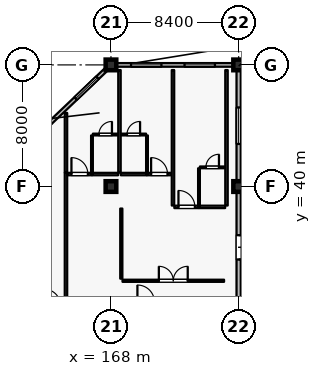
"""IFC4 building model, lengths in metres.
Left out: names, types, materials, properties, quantities, classifications, styles, units other than length and angle.
Written with IfcOpenShell. Run it as: python <this file> out.ifc"""

import sys

from ifc_helpers import new_model, si_unit, direction, frame, frame_2d, origin, origin_2d, place, context, subcontext, project, spatial, rectangle, extrude, element, fill, save


model = new_model("IFC4")
c1 = context("Model", 3, precision=1e-05, world=origin(), true_north=direction((0.0, 1.0)))
c2 = subcontext(c1, "Body", "Model", "MODEL_VIEW")
j1 = project(units=[si_unit("LENGTHUNIT", "METRE"), si_unit("PLANEANGLEUNIT", "RADIAN")], contexts=[c1])
p1 = place(None, origin())
s1 = spatial("IfcSite", under=j1, at=p1, CompositionType="ELEMENT")
p2 = place(p1, origin())
s2 = spatial("IfcBuilding", under=s1, at=p2, CompositionType="ELEMENT")
p3 = place(p2, frame((0.0, 0.0, 28.8)))
s3 = spatial("IfcBuildingStorey", under=s2, at=p3, CompositionType="ELEMENT", Elevation=28.8)
for number, where, z_axis, x_axis in (
    (1, (168.0, 48.0, 0.0), (0.0, 0.0, 1.0), (1.0, 0.0, 0.0)),
    (2, (176.4, 48.0, 0.0), (0.0, 0.0, 1.0), (1.0, 0.0, 0.0)),
    (3, (168.0, 40.0, 0.0), (0.0, 0.0, 1.0), (1.0, 0.0, 0.0)),
    (4, (176.4, 40.0, 0.0), (0.0, 0.0, 1.0), (1.0, 0.0, 0.0)),
):
    element("IfcColumn", number, at=place(p3, frame(where, z_axis=z_axis, x_axis=x_axis)), inside=s3, PredefinedType="COLUMN", context=c2, shape_type="SweptSolid", body=[
        extrude(rectangle(XDim=0.7, YDim=0.7, at=origin_2d()), origin(), (0.0, 0.0, 1.0), 3.6),
    ])
p4 = place(p3, frame((159.95, 40.333, 0.0), z_axis=(0.0, 0.0, 1.0), x_axis=(0.724105170588, 0.689689569247, 0.0)))
e5 = element("IfcWall", 5, at=p4, inside=s3, PredefinedType="SOLIDWALL", context=c2, shape_type="SweptSolid", body=[
    extrude(rectangle(XDim=10.634, YDim=0.24, at=frame_2d((5.317, 0.0))), origin(), (0.0, 0.0, 1.0), 2.93),
])
p5 = place(p4, frame((0.215, 0.0, 0.8)))
e6 = element("IfcOpeningElement", 6, at=p5, cuts=e5, PredefinedType="OPENING", context=c2, shape_type="SweptSolid", body=[
    extrude(rectangle(XDim=1.6, YDim=1.6, at=frame_2d((0.8, 0.8))), frame((0.0, 0.13, 0.0), z_axis=(0.0, -1.0, 0.0), x_axis=(1.0, 0.0, 0.0)), (0.0, 0.0, 1.0), 0.26),
])
p6 = place(p4, frame((3.599, 0.0, 0.8)))
e7 = element("IfcOpeningElement", 7, at=p6, cuts=e5, PredefinedType="OPENING", context=c2, shape_type="SweptSolid", body=[
    extrude(rectangle(XDim=2.0, YDim=1.75, at=frame_2d((1.0, 0.875))), frame((0.0, 0.13, 0.0), z_axis=(0.0, -1.0, 0.0), x_axis=(1.0, 0.0, 0.0)), (0.0, 0.0, 1.0), 0.26),
])
p7 = place(p4, frame((7.901, 0.0, 0.8)))
e8 = element("IfcOpeningElement", 8, at=p7, cuts=e5, PredefinedType="OPENING", context=c2, shape_type="SweptSolid", body=[
    extrude(rectangle(XDim=2.0, YDim=1.75, at=frame_2d((1.0, 0.875))), frame((0.0, 0.13, 0.0), z_axis=(0.0, -1.0, 0.0), x_axis=(1.0, 0.0, 0.0)), (0.0, 0.0, 1.0), 0.26),
])
p8 = place(p3, frame((168.35, 48.0, 0.0), z_axis=(0.0, 0.0, 1.0), x_axis=(1.0, 0.0, 0.0)))
e9 = element("IfcWall", 9, at=p8, inside=s3, PredefinedType="SOLIDWALL", context=c2, shape_type="SweptSolid", body=[
    extrude(rectangle(XDim=7.7, YDim=0.24, at=frame_2d((3.85, 0.0))), origin(), (0.0, 0.0, 1.0), 2.93),
])
p9 = place(p8, frame((0.97, 0.0, 0.8)))
e10 = element("IfcOpeningElement", 10, at=p9, cuts=e9, PredefinedType="OPENING", context=c2, shape_type="SweptSolid", body=[
    extrude(rectangle(XDim=2.0, YDim=1.75, at=frame_2d((1.0, 0.875))), frame((0.0, 0.13, 0.0), z_axis=(0.0, -1.0, 0.0), x_axis=(1.0, 0.0, 0.0)), (0.0, 0.0, 1.0), 0.26),
])
p10 = place(p8, frame((4.49, 0.0, 0.8)))
e11 = element("IfcOpeningElement", 11, at=p10, cuts=e9, PredefinedType="OPENING", context=c2, shape_type="SweptSolid", body=[
    extrude(rectangle(XDim=2.0, YDim=1.75, at=frame_2d((1.0, 0.875))), frame((0.0, 0.13, 0.0), z_axis=(0.0, -1.0, 0.0), x_axis=(1.0, 0.0, 0.0)), (0.0, 0.0, 1.0), 0.26),
])
p11 = place(p3, frame((176.4, 47.65, 0.0), z_axis=(0.0, 0.0, 1.0), x_axis=(0.0, -1.0, 0.0)))
e12 = element("IfcWall", 12, at=p11, inside=s3, PredefinedType="SOLIDWALL", context=c2, shape_type="SweptSolid", body=[
    extrude(rectangle(XDim=7.3, YDim=0.28, at=frame_2d((3.65, 0.0))), origin(), (0.0, 0.0, 1.0), 2.7),
])
p12 = place(p11, frame((2.45, 0.0, 0.5)))
e13 = element("IfcOpeningElement", 13, at=p12, cuts=e12, PredefinedType="OPENING", context=c2, shape_type="SweptSolid", body=[
    extrude(rectangle(XDim=2.4, YDim=1.65, at=frame_2d((1.2, 0.825))), frame((0.0, 0.15, 0.0), z_axis=(0.0, -1.0, 0.0), x_axis=(1.0, 0.0, 0.0)), (0.0, 0.0, 1.0), 0.3),
])
p13 = place(p3, frame((176.4, 39.65, 0.0), z_axis=(0.0, 0.0, 1.0), x_axis=(0.0, -1.0, 0.0)))
e14 = element("IfcWall", 14, at=p13, inside=s3, PredefinedType="SOLIDWALL", context=c2, shape_type="SweptSolid", body=[
    extrude(rectangle(XDim=7.3, YDim=0.28, at=frame_2d((3.65, 0.0))), origin(), (0.0, 0.0, 1.0), 2.7),
])
p14 = place(p13, frame((2.85, 0.0, 0.0)))
e15 = element("IfcOpeningElement", 15, at=p14, cuts=e14, PredefinedType="OPENING", context=c2, shape_type="SweptSolid", body=[
    extrude(rectangle(XDim=1.6, YDim=2.25, at=frame_2d((0.8, 1.125))), frame((0.0, 0.15, 0.0), z_axis=(0.0, -1.0, 0.0), x_axis=(1.0, 0.0, 0.0)), (0.0, 0.0, 1.0), 0.3),
])
p15 = place(p3, frame((165.04, 32.26, 0.0), z_axis=(0.0, 0.0, 1.0), x_axis=(0.0, 1.0, 0.0)))
e16 = element("IfcWall", 16, at=p15, inside=s3, PredefinedType="PARTITIONING", context=c2, shape_type="SweptSolid", body=[
    extrude(rectangle(XDim=8.64, YDim=0.16, at=frame_2d((4.32, 0.0))), origin(), (0.0, 0.0, 1.0), 3.365),
])
p16 = place(p3, frame((165.13, 40.82, 0.0), z_axis=(0.0, 0.0, 1.0), x_axis=(1.0, 0.0, 0.0)))
e17 = element("IfcWall", 17, at=p16, inside=s3, PredefinedType="PARTITIONING", context=c2, shape_type="SweptSolid", body=[
    extrude(rectangle(XDim=1.62, YDim=0.16, at=frame_2d((0.81, 0.0))), origin(), (0.0, 0.0, 1.0), 3.365),
])
p17 = place(p16, frame((0.27, 0.0, 0.0)))
e18 = element("IfcOpeningElement", 18, at=p17, cuts=e17, PredefinedType="OPENING", context=c2, shape_type="SweptSolid", body=[
    extrude(rectangle(XDim=1.08, YDim=2.3, at=frame_2d((0.54, 1.15))), frame((0.0, 0.09, 0.0), z_axis=(0.0, -1.0, 0.0), x_axis=(1.0, 0.0, 0.0)), (0.0, 0.0, 1.0), 0.18),
])
p18 = place(p3, frame((166.76, 40.82, 0.0), z_axis=(0.0, 0.0, 1.0), x_axis=(1.0, 0.0, 0.0)))
e19 = element("IfcWall", 19, at=p18, inside=s3, PredefinedType="PARTITIONING", context=c2, shape_type="SweptSolid", body=[
    extrude(rectangle(XDim=1.71, YDim=0.16, at=frame_2d((0.855, 0.0))), origin(), (0.0, 0.0, 1.0), 3.365),
])
p19 = place(p3, frame((166.75, 40.91, 0.0), z_axis=(0.0, 0.0, 1.0), x_axis=(0.0, 1.0, 0.0)))
e20 = element("IfcWall", 20, at=p19, inside=s3, PredefinedType="PARTITIONING", context=c2, shape_type="SweptSolid", body=[
    extrude(rectangle(XDim=2.45, YDim=0.115, at=frame_2d((1.225, 0.0))), origin(), (0.0, 0.0, 1.0), 3.365),
])
p20 = place(p3, frame((166.81, 43.42, 0.0), z_axis=(0.0, 0.0, 1.0), x_axis=(1.0, 0.0, 0.0)))
e21 = element("IfcWall", 21, at=p20, inside=s3, PredefinedType="PARTITIONING", context=c2, shape_type="SweptSolid", body=[
    extrude(rectangle(XDim=1.65, YDim=0.115, at=frame_2d((0.825, 0.0))), origin(), (0.0, 0.0, 1.0), 3.365),
])
p21 = place(p20, frame((0.395, 0.0, 0.0)))
e22 = element("IfcOpeningElement", 22, at=p21, cuts=e21, PredefinedType="OPENING", context=c2, shape_type="SweptSolid", body=[
    extrude(rectangle(XDim=0.86, YDim=2.12, at=frame_2d((0.43, 1.06))), frame((0.0, 0.067, 0.0), z_axis=(0.0, -1.0, 0.0), x_axis=(1.0, 0.0, 0.0)), (0.0, 0.0, 1.0), 0.135),
])
p22 = place(p3, frame((165.04, 40.91, 0.0), z_axis=(0.0, 0.0, 1.0), x_axis=(0.0, 1.0, 0.0)))
e23 = element("IfcWall", 23, at=p22, inside=s3, PredefinedType="PARTITIONING", context=c2, shape_type="SweptSolid", body=[
    extrude(rectangle(XDim=3.93, YDim=0.16, at=frame_2d((1.965, 0.0))), origin(), (0.0, 0.0, 1.0), 3.365),
])
p23 = place(p3, frame((168.65, 40.82, 0.0), z_axis=(0.0, 0.0, 1.0), x_axis=(1.0, 0.0, 0.0)))
e24 = element("IfcWall", 24, at=p23, inside=s3, PredefinedType="PARTITIONING", context=c2, shape_type="SweptSolid", body=[
    extrude(rectangle(XDim=1.71, YDim=0.16, at=frame_2d((0.855, 0.0))), origin(), (0.0, 0.0, 1.0), 3.365),
])
p24 = place(p3, frame((170.37, 40.82, 0.0), z_axis=(0.0, 0.0, 1.0), x_axis=(1.0, 0.0, 0.0)))
e25 = element("IfcWall", 25, at=p24, inside=s3, PredefinedType="PARTITIONING", context=c2, shape_type="SweptSolid", body=[
    extrude(rectangle(XDim=1.62, YDim=0.16, at=frame_2d((0.81, 0.0))), origin(), (0.0, 0.0, 1.0), 3.365),
])
p25 = place(p24, frame((0.27, 0.0, 0.0)))
e26 = element("IfcOpeningElement", 26, at=p25, cuts=e25, PredefinedType="OPENING", context=c2, shape_type="SweptSolid", body=[
    extrude(rectangle(XDim=1.08, YDim=2.3, at=frame_2d((0.54, 1.15))), frame((0.0, 0.09, 0.0), z_axis=(0.0, -1.0, 0.0), x_axis=(1.0, 0.0, 0.0)), (0.0, 0.0, 1.0), 0.18),
])
p26 = place(p3, frame((170.37, 40.91, 0.0), z_axis=(0.0, 0.0, 1.0), x_axis=(0.0, 1.0, 0.0)))
e27 = element("IfcWall", 27, at=p26, inside=s3, PredefinedType="PARTITIONING", context=c2, shape_type="SweptSolid", body=[
    extrude(rectangle(XDim=2.45, YDim=0.115, at=frame_2d((1.225, 0.0))), origin(), (0.0, 0.0, 1.0), 3.365),
])
p27 = place(p3, frame((168.66, 43.42, 0.0), z_axis=(0.0, 0.0, 1.0), x_axis=(1.0, 0.0, 0.0)))
e28 = element("IfcWall", 28, at=p27, inside=s3, PredefinedType="PARTITIONING", context=c2, shape_type="SweptSolid", body=[
    extrude(rectangle(XDim=1.65, YDim=0.115, at=frame_2d((0.825, 0.0))), origin(), (0.0, 0.0, 1.0), 3.365),
])
p28 = place(p27, frame((0.395, 0.0, 0.0)))
e29 = element("IfcOpeningElement", 29, at=p28, cuts=e28, PredefinedType="OPENING", context=c2, shape_type="SweptSolid", body=[
    extrude(rectangle(XDim=0.86, YDim=2.12, at=frame_2d((0.43, 1.06))), frame((0.0, 0.067, 0.0), z_axis=(0.0, -1.0, 0.0), x_axis=(1.0, 0.0, 0.0)), (0.0, 0.0, 1.0), 0.135),
])
p29 = place(p3, frame((168.56, 40.91, 0.0), z_axis=(0.0, 0.0, 1.0), x_axis=(0.0, 1.0, 0.0)))
e30 = element("IfcWall", 30, at=p29, inside=s3, PredefinedType="PARTITIONING", context=c2, shape_type="SweptSolid", body=[
    extrude(rectangle(XDim=6.75, YDim=0.16, at=frame_2d((3.375, 0.0))), origin(), (0.0, 0.0, 1.0), 3.365),
])
p30 = place(p3, frame((172.17, 38.66, 0.0), z_axis=(0.0, 0.0, 1.0), x_axis=(1.0, 0.0, 0.0)))
e31 = element("IfcWall", 31, at=p30, inside=s3, PredefinedType="PARTITIONING", context=c2, shape_type="SweptSolid", body=[
    extrude(rectangle(XDim=1.62, YDim=0.16, at=frame_2d((0.81, 0.0))), origin(), (0.0, 0.0, 1.0), 3.365),
])
p31 = place(p30, frame((0.27, 0.0, 0.0)))
e32 = element("IfcOpeningElement", 32, at=p31, cuts=e31, PredefinedType="OPENING", context=c2, shape_type="SweptSolid", body=[
    extrude(rectangle(XDim=1.08, YDim=2.3, at=frame_2d((0.54, 1.15))), frame((0.0, 0.09, 0.0), z_axis=(0.0, -1.0, 0.0), x_axis=(1.0, 0.0, 0.0)), (0.0, 0.0, 1.0), 0.18),
])
p32 = place(p3, frame((173.8, 38.66, 0.0), z_axis=(0.0, 0.0, 1.0), x_axis=(1.0, 0.0, 0.0)))
e33 = element("IfcWall", 33, at=p32, inside=s3, PredefinedType="PARTITIONING", context=c2, shape_type="SweptSolid", body=[
    extrude(rectangle(XDim=1.71, YDim=0.16, at=frame_2d((0.855, 0.0))), origin(), (0.0, 0.0, 1.0), 3.365),
])
p33 = place(p3, frame((173.79, 38.75, 0.0), z_axis=(0.0, 0.0, 1.0), x_axis=(0.0, 1.0, 0.0)))
e34 = element("IfcWall", 34, at=p33, inside=s3, PredefinedType="PARTITIONING", context=c2, shape_type="SweptSolid", body=[
    extrude(rectangle(XDim=2.45, YDim=0.115, at=frame_2d((1.225, 0.0))), origin(), (0.0, 0.0, 1.0), 3.365),
])
p34 = place(p3, frame((173.85, 41.26, 0.0), z_axis=(0.0, 0.0, 1.0), x_axis=(1.0, 0.0, 0.0)))
e35 = element("IfcWall", 35, at=p34, inside=s3, PredefinedType="PARTITIONING", context=c2, shape_type="SweptSolid", body=[
    extrude(rectangle(XDim=1.65, YDim=0.115, at=frame_2d((0.825, 0.0))), origin(), (0.0, 0.0, 1.0), 3.365),
])
p35 = place(p34, frame((0.395, 0.0, 0.0)))
e36 = element("IfcOpeningElement", 36, at=p35, cuts=e35, PredefinedType="OPENING", context=c2, shape_type="SweptSolid", body=[
    extrude(rectangle(XDim=0.86, YDim=2.12, at=frame_2d((0.43, 1.06))), frame((0.0, 0.067, 0.0), z_axis=(0.0, -1.0, 0.0), x_axis=(1.0, 0.0, 0.0)), (0.0, 0.0, 1.0), 0.135),
])
for number, where, z_axis, x_axis in (
    (37, (172.08, 38.75, 0.0), (0.0, 0.0, 1.0), (0.0, 1.0, 0.0)),
    (38, (175.6, 38.75, 0.0), (0.0, 0.0, 1.0), (0.0, 1.0, 0.0)),
):
    element("IfcWall", number, at=place(p3, frame(where, z_axis=z_axis, x_axis=x_axis)), inside=s3, PredefinedType="PARTITIONING", context=c2, shape_type="SweptSolid", body=[
        extrude(rectangle(XDim=8.91, YDim=0.16, at=frame_2d((4.455, 0.0))), origin(), (0.0, 0.0, 1.0), 3.365),
    ])
p36 = place(p3, frame((168.76, 33.8, 0.0), z_axis=(0.0, 0.0, 1.0), x_axis=(1.0, 0.0, 0.0)))
e39 = element("IfcWall", 39, at=p36, inside=s3, PredefinedType="PARTITIONING", context=c2, shape_type="SweptSolid", body=[
    extrude(rectangle(XDim=6.68, YDim=0.14, at=frame_2d((3.34, 0.0))), origin(), (0.0, 0.0, 1.0), 3.365),
])
p37 = place(p36, frame((2.39, 0.0, 0.0)))
e40 = element("IfcOpeningElement", 40, at=p37, cuts=e39, PredefinedType="OPENING", context=c2, shape_type="SweptSolid", body=[
    extrude(rectangle(XDim=1.9, YDim=2.4, at=frame_2d((0.95, 1.2))), frame((0.0, 0.08, 0.0), z_axis=(0.0, -1.0, 0.0), x_axis=(1.0, 0.0, 0.0)), (0.0, 0.0, 1.0), 0.16),
])
p38 = place(p3, frame((168.68, 33.94, 0.0), z_axis=(0.0, 0.0, 1.0), x_axis=(0.0, 1.0, 0.0)))
e41 = element("IfcWall", 41, at=p38, inside=s3, PredefinedType="PARTITIONING", context=c2, shape_type="SweptSolid", body=[
    extrude(rectangle(XDim=4.61, YDim=0.14, at=frame_2d((2.305, 0.0))), origin(), (0.0, 0.0, 1.0), 3.365),
])
p39 = place(p7, origin())
e42 = element("IfcWindow", 42, at=p39, inside=s3, PartitioningType="DOUBLE_PANEL_VERTICAL", PredefinedType="WINDOW", context=c2, shape_type="SweptSolid", body=[
    extrude(rectangle(XDim=2.0, YDim=1.75, at=frame_2d((1.0, 0.875))), frame((0.0, 0.03, 0.0), z_axis=(0.0, -1.0, 0.0), x_axis=(1.0, 0.0, 0.0)), (0.0, 0.0, 1.0), 0.06),
])
fill(e8, e42)
p40 = place(p9, origin())
e43 = element("IfcWindow", 43, at=p40, inside=s3, PartitioningType="DOUBLE_PANEL_VERTICAL", PredefinedType="WINDOW", context=c2, shape_type="SweptSolid", body=[
    extrude(rectangle(XDim=2.0, YDim=1.75, at=frame_2d((1.0, 0.875))), frame((0.0, 0.03, 0.0), z_axis=(0.0, -1.0, 0.0), x_axis=(1.0, 0.0, 0.0)), (0.0, 0.0, 1.0), 0.06),
])
fill(e10, e43)
p41 = place(p10, origin())
e44 = element("IfcWindow", 44, at=p41, inside=s3, PartitioningType="DOUBLE_PANEL_VERTICAL", PredefinedType="WINDOW", context=c2, shape_type="SweptSolid", body=[
    extrude(rectangle(XDim=2.0, YDim=1.75, at=frame_2d((1.0, 0.875))), frame((0.0, 0.03, 0.0), z_axis=(0.0, -1.0, 0.0), x_axis=(1.0, 0.0, 0.0)), (0.0, 0.0, 1.0), 0.06),
])
fill(e11, e44)
p42 = place(p12, origin())
e45 = element("IfcWindow", 45, at=p42, inside=s3, PartitioningType="DOUBLE_PANEL_VERTICAL", PredefinedType="WINDOW", context=c2, shape_type="SweptSolid", body=[
    extrude(rectangle(XDim=2.4, YDim=1.65, at=frame_2d((1.2, 0.825))), frame((0.0, 0.03, 0.0), z_axis=(0.0, -1.0, 0.0), x_axis=(1.0, 0.0, 0.0)), (0.0, 0.0, 1.0), 0.06),
])
fill(e13, e45)
p43 = place(p14, origin())
e46 = element("IfcDoor", 46, at=p43, inside=s3, OperationType="DOUBLE_DOOR_SINGLE_SWING", PredefinedType="DOOR", context=c2, shape_type="SweptSolid", body=[
    extrude(rectangle(XDim=1.6, YDim=2.25, at=frame_2d((0.8, 1.125))), frame((0.0, 0.025, 0.0), z_axis=(0.0, -1.0, 0.0), x_axis=(1.0, 0.0, 0.0)), (0.0, 0.0, 1.0), 0.05),
])
fill(e15, e46)
p44 = place(p17, origin())
e47 = element("IfcDoor", 47, at=p44, inside=s3, OperationType="SINGLE_SWING_LEFT", PredefinedType="DOOR", context=c2, shape_type="SweptSolid", body=[
    extrude(rectangle(XDim=1.08, YDim=2.3, at=frame_2d((0.54, 1.15))), frame((0.0, 0.025, 0.0), z_axis=(0.0, -1.0, 0.0), x_axis=(1.0, 0.0, 0.0)), (0.0, 0.0, 1.0), 0.05),
])
fill(e18, e47)
p45 = place(p21, origin())
e48 = element("IfcDoor", 48, at=p45, inside=s3, OperationType="SINGLE_SWING_RIGHT", PredefinedType="DOOR", context=c2, shape_type="SweptSolid", body=[
    extrude(rectangle(XDim=0.86, YDim=2.12, at=frame_2d((0.43, 1.06))), frame((0.0, 0.025, 0.0), z_axis=(0.0, -1.0, 0.0), x_axis=(1.0, 0.0, 0.0)), (0.0, 0.0, 1.0), 0.05),
])
fill(e22, e48)
p46 = place(p25, origin())
e49 = element("IfcDoor", 49, at=p46, inside=s3, OperationType="SINGLE_SWING_LEFT", PredefinedType="DOOR", context=c2, shape_type="SweptSolid", body=[
    extrude(rectangle(XDim=1.08, YDim=2.3, at=frame_2d((0.54, 1.15))), frame((0.0, 0.025, 0.0), z_axis=(0.0, -1.0, 0.0), x_axis=(1.0, 0.0, 0.0)), (0.0, 0.0, 1.0), 0.05),
])
fill(e26, e49)
p47 = place(p28, origin())
e50 = element("IfcDoor", 50, at=p47, inside=s3, OperationType="SINGLE_SWING_RIGHT", PredefinedType="DOOR", context=c2, shape_type="SweptSolid", body=[
    extrude(rectangle(XDim=0.86, YDim=2.12, at=frame_2d((0.43, 1.06))), frame((0.0, 0.025, 0.0), z_axis=(0.0, -1.0, 0.0), x_axis=(1.0, 0.0, 0.0)), (0.0, 0.0, 1.0), 0.05),
])
fill(e29, e50)
p48 = place(p31, origin())
e51 = element("IfcDoor", 51, at=p48, inside=s3, OperationType="SINGLE_SWING_LEFT", PredefinedType="DOOR", context=c2, shape_type="SweptSolid", body=[
    extrude(rectangle(XDim=1.08, YDim=2.3, at=frame_2d((0.54, 1.15))), frame((0.0, 0.025, 0.0), z_axis=(0.0, -1.0, 0.0), x_axis=(1.0, 0.0, 0.0)), (0.0, 0.0, 1.0), 0.05),
])
fill(e32, e51)
p49 = place(p35, origin())
e52 = element("IfcDoor", 52, at=p49, inside=s3, OperationType="SINGLE_SWING_RIGHT", PredefinedType="DOOR", context=c2, shape_type="SweptSolid", body=[
    extrude(rectangle(XDim=0.86, YDim=2.12, at=frame_2d((0.43, 1.06))), frame((0.0, 0.025, 0.0), z_axis=(0.0, -1.0, 0.0), x_axis=(1.0, 0.0, 0.0)), (0.0, 0.0, 1.0), 0.05),
])
fill(e36, e52)
p50 = place(p37, origin())
e53 = element("IfcDoor", 53, at=p50, inside=s3, OperationType="DOUBLE_DOOR_SINGLE_SWING", PredefinedType="DOOR", context=c2, shape_type="SweptSolid", body=[
    extrude(rectangle(XDim=1.9, YDim=2.4, at=frame_2d((0.95, 1.2))), frame((0.0, 0.025, 0.0), z_axis=(0.0, -1.0, 0.0), x_axis=(1.0, 0.0, 0.0)), (0.0, 0.0, 1.0), 0.05),
])
fill(e40, e53)
save(model, sys.argv[1])
